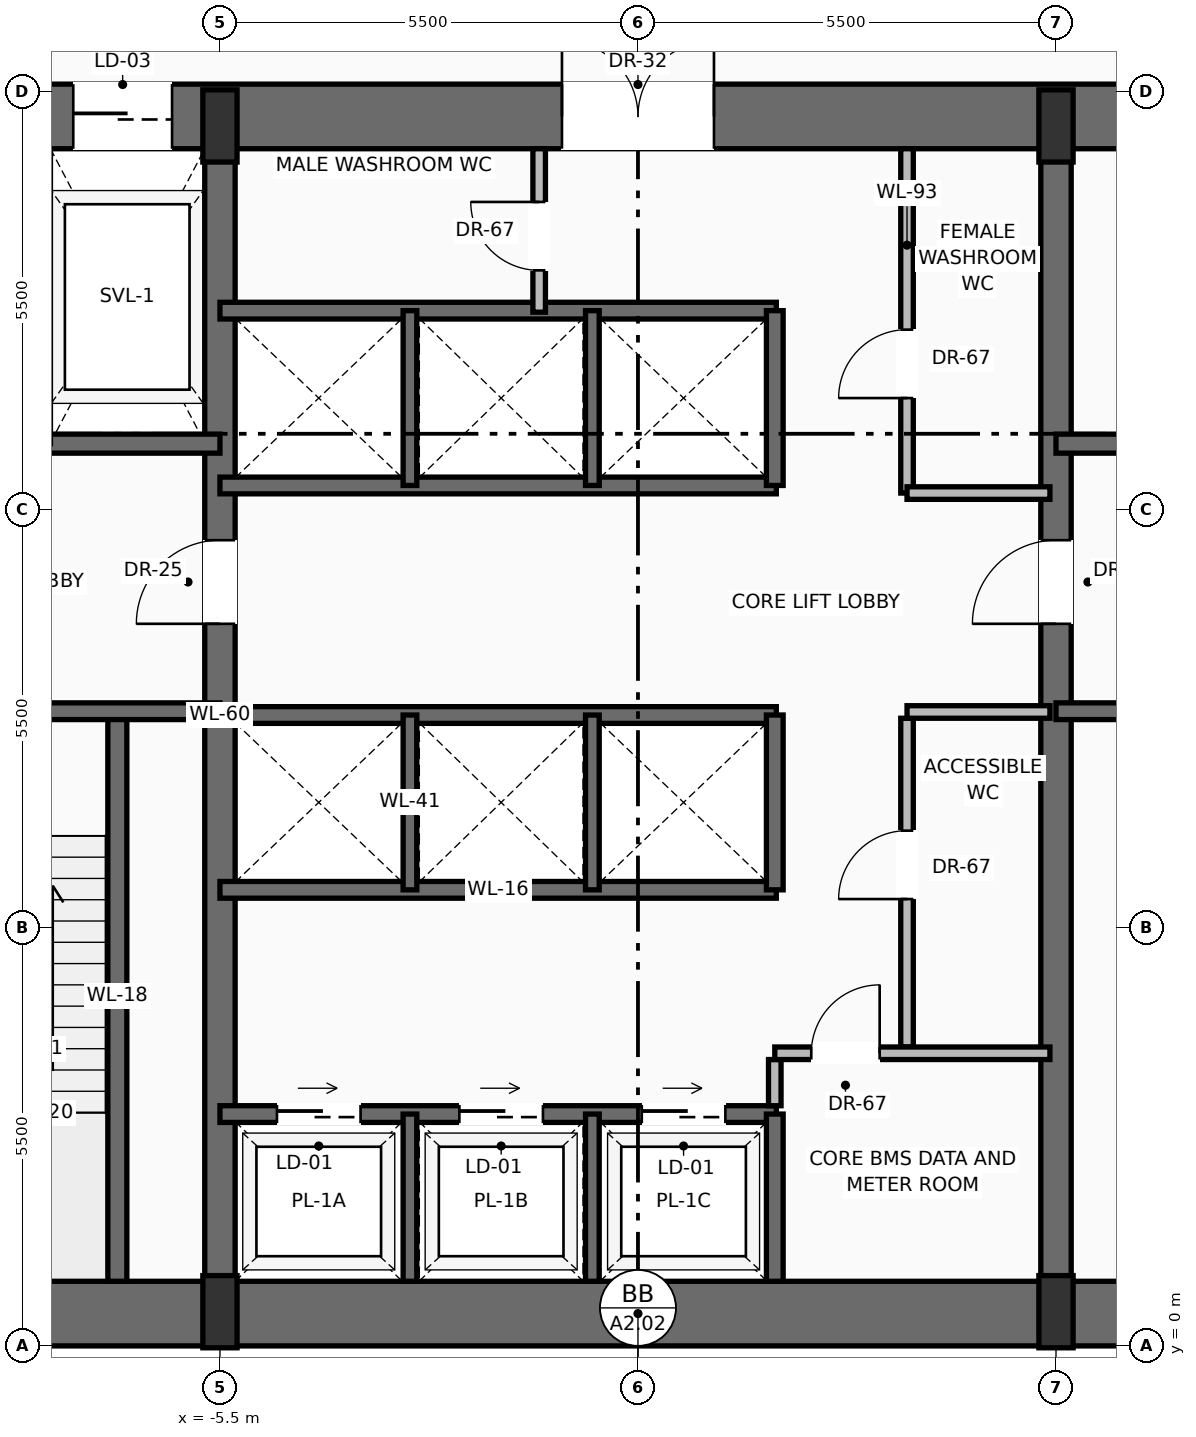
"""IFC4 building model, lengths in metres.
Left out: names, types, materials, properties, quantities, classifications, styles, units other than length and angle.
Written with IfcOpenShell. Run it as: python <this file> out.ifc"""

import sys

from ifc_helpers import new_model, si_unit, direction, frame, frame_2d, origin, origin_2d, place, context, subcontext, project, spatial, rectangle, extrude, source, transform, mapped, element, fill, save


model = new_model("IFC4")
c1 = context("Model", 3, precision=1e-05, world=origin(), true_north=direction((0.0, 1.0)))
c2 = subcontext(c1, "Body", "Model", "MODEL_VIEW")
j1 = project(units=[si_unit("LENGTHUNIT", "METRE"), si_unit("PLANEANGLEUNIT", "RADIAN")], contexts=[c1])
p1 = place(None, origin())
s1 = spatial("IfcSite", under=j1, at=p1, CompositionType="ELEMENT")
p2 = place(p1, origin())
s2 = spatial("IfcBuilding", under=s1, at=p2, CompositionType="ELEMENT")
p3 = place(p2, frame((0.0, 0.0, 71.9)))
s3 = spatial("IfcBuildingStorey", under=s2, at=p3, CompositionType="ELEMENT", Elevation=71.9)
p4 = place(p3, frame((-10.65, 0.425, 0.0), z_axis=(0.0, 0.0, 1.0), x_axis=(1.0, 0.0, 0.0)))
e1 = element("IfcWall", 1, at=p4, inside=s3, PredefinedType="SHEAR", context=c2, shape_type="SweptSolid", body=[
    extrude(rectangle(XDim=21.3, YDim=0.85, at=frame_2d((10.65, 0.0))), origin(), (0.0, 0.0, 1.0), 4.45),
])
p5 = place(p3, frame((-11.0, 16.175, 0.0), z_axis=(0.0, 0.0, 1.0), x_axis=(1.0, 0.0, 0.0)))
e2 = element("IfcWall", 2, at=p5, inside=s3, PredefinedType="SHEAR", context=c2, shape_type="SweptSolid", body=[
    extrude(rectangle(XDim=22.0, YDim=0.85, at=frame_2d((11.0, 0.0))), origin(), (0.0, 0.0, 1.0), 4.45),
])
p6 = place(p5, frame((3.57, 0.0, 0.0)))
e3 = element("IfcOpeningElement", 3, at=p6, cuts=e2, PredefinedType="OPENING", context=c2, shape_type="SweptSolid", body=[
    extrude(rectangle(XDim=1.3, YDim=2.3, at=frame_2d((0.65, 1.15))), frame((0.0, 0.435, 0.0), z_axis=(0.0, -1.0, 0.0), x_axis=(1.0, 0.0, 0.0)), (0.0, 0.0, 1.0), 0.87),
])
p7 = place(p5, frame((10.0, 0.0, 0.0)))
e4 = element("IfcOpeningElement", 4, at=p7, cuts=e2, PredefinedType="OPENING", context=c2, shape_type="SweptSolid", body=[
    extrude(rectangle(XDim=2.0, YDim=2.4, at=frame_2d((1.0, 1.2))), frame((0.0, 0.435, 0.0), z_axis=(0.0, -1.0, 0.0), x_axis=(1.0, 0.0, 0.0)), (0.0, 0.0, 1.0), 0.87),
])
p8 = place(p3, frame((-5.5, 0.425, 0.0), z_axis=(0.0, 0.0, 1.0), x_axis=(0.0, 1.0, 0.0)))
e5 = element("IfcWall", 5, at=p8, inside=s3, PredefinedType="SHEAR", context=c2, shape_type="SweptSolid", body=[
    extrude(rectangle(XDim=15.75, YDim=0.4, at=frame_2d((7.875, 0.0))), origin(), (0.0, 0.0, 1.0), 4.45),
])
p9 = place(p8, frame((9.075, 0.0, 0.0)))
e6 = element("IfcOpeningElement", 6, at=p9, cuts=e5, PredefinedType="OPENING", context=c2, shape_type="SweptSolid", body=[
    extrude(rectangle(XDim=1.1, YDim=2.2, at=frame_2d((0.55, 1.1))), frame((0.0, 0.21, 0.0), z_axis=(0.0, -1.0, 0.0), x_axis=(1.0, 0.0, 0.0)), (0.0, 0.0, 1.0), 0.42),
])
p10 = place(p3, frame((5.5, 0.425, 0.0), z_axis=(0.0, 0.0, 1.0), x_axis=(0.0, 1.0, 0.0)))
e7 = element("IfcWall", 7, at=p10, inside=s3, PredefinedType="SHEAR", context=c2, shape_type="SweptSolid", body=[
    extrude(rectangle(XDim=15.75, YDim=0.4, at=frame_2d((7.875, 0.0))), origin(), (0.0, 0.0, 1.0), 4.45),
])
p11 = place(p10, frame((9.075, 0.0, 0.0)))
e8 = element("IfcOpeningElement", 8, at=p11, cuts=e7, PredefinedType="OPENING", context=c2, shape_type="SweptSolid", body=[
    extrude(rectangle(XDim=1.1, YDim=2.2, at=frame_2d((0.55, 1.1))), frame((0.0, 0.21, 0.0), z_axis=(0.0, -1.0, 0.0), x_axis=(1.0, 0.0, 0.0)), (0.0, 0.0, 1.0), 0.42),
])
m1 = source(origin(), c2, "Body", "SweptSolid", [
    extrude(rectangle(XDim=0.45, YDim=0.95, at=origin_2d()), origin(), (0.0, 0.0, 1.0), 4.7),
])
for number, where, z_axis, x_axis in (
    (9, (-5.5, 0.45, 0.0), (0.0, 0.0, 1.0), (1.0, 0.0, 0.0)),
    (10, (5.5, 0.45, 0.0), (0.0, 0.0, 1.0), (1.0, 0.0, 0.0)),
    (11, (-5.5, 16.05, 0.0), (0.0, 0.0, 1.0), (1.0, 0.0, 0.0)),
    (12, (5.5, 16.05, 0.0), (0.0, 0.0, 1.0), (1.0, 0.0, 0.0)),
):
    element("IfcColumn", number, at=place(p3, frame(where, z_axis=z_axis, x_axis=x_axis)), inside=s3, PredefinedType="PILASTER", context=c2, shape_type="MappedRepresentation", body=[
        mapped(m1, transform((0.0, 0.0, 0.0), scale=1.0)),
    ])
p12 = place(p3, frame((-6.85, 0.85, 0.0), z_axis=(0.0, 0.0, 1.0), x_axis=(0.0, 1.0, 0.0)))
e13 = element("IfcWall", 13, at=p12, inside=s3, PredefinedType="SOLIDWALL", context=c2, shape_type="SweptSolid", body=[
    extrude(rectangle(XDim=7.5, YDim=0.25, at=frame_2d((3.75, 0.0))), origin(), (0.0, 0.0, 1.0), 4.45),
])
p13 = place(p3, frame((-5.5, 8.35, 0.0), z_axis=(0.0, 0.0, 1.0), x_axis=(-1.0, 0.0, 0.0)))
e14 = element("IfcWall", 14, at=p13, inside=s3, PredefinedType="SOLIDWALL", context=c2, shape_type="SweptSolid", body=[
    extrude(rectangle(XDim=4.65, YDim=0.22, at=frame_2d((2.325, 0.0))), origin(), (0.0, 0.0, 1.0), 4.45),
])
p14 = place(p13, frame((2.5, 0.0, 0.0)))
e15 = element("IfcOpeningElement", 15, at=p14, cuts=e14, PredefinedType="OPENING", context=c2, shape_type="SweptSolid", body=[
    extrude(rectangle(XDim=1.15, YDim=2.2, at=frame_2d((0.575, 1.1))), frame((0.0, 0.12, 0.0), z_axis=(0.0, -1.0, 0.0), x_axis=(1.0, 0.0, 0.0)), (0.0, 0.0, 1.0), 0.24),
])
p15 = place(p3, frame((-5.5, 11.87, 0.0), z_axis=(0.0, 0.0, 1.0), x_axis=(-1.0, 0.0, 0.0)))
e16 = element("IfcWall", 16, at=p15, inside=s3, PredefinedType="SOLIDWALL", context=c2, shape_type="SweptSolid", body=[
    extrude(rectangle(XDim=4.65, YDim=0.25, at=frame_2d((2.325, 0.0))), origin(), (0.0, 0.0, 1.0), 4.45),
])
p16 = place(p15, frame((2.95, 0.0, 0.0)))
e17 = element("IfcOpeningElement", 17, at=p16, cuts=e16, PredefinedType="OPENING", context=c2, shape_type="SweptSolid", body=[
    extrude(rectangle(XDim=1.2, YDim=2.25, at=frame_2d((0.6, 1.125))), frame((0.0, 0.135, 0.0), z_axis=(0.0, -1.0, 0.0), x_axis=(1.0, 0.0, 0.0)), (0.0, 0.0, 1.0), 0.27),
])
p17 = place(p3, frame((10.15, 8.35, 0.0), z_axis=(0.0, 0.0, 1.0), x_axis=(-1.0, 0.0, 0.0)))
e18 = element("IfcWall", 18, at=p17, inside=s3, PredefinedType="SOLIDWALL", context=c2, shape_type="SweptSolid", body=[
    extrude(rectangle(XDim=4.65, YDim=0.22, at=frame_2d((2.325, 0.0))), origin(), (0.0, 0.0, 1.0), 4.45),
])
p18 = place(p17, frame((1.0, 0.0, 0.0)))
e19 = element("IfcOpeningElement", 19, at=p18, cuts=e18, PredefinedType="OPENING", context=c2, shape_type="SweptSolid", body=[
    extrude(rectangle(XDim=1.15, YDim=2.2, at=frame_2d((0.575, 1.1))), frame((0.0, 0.12, 0.0), z_axis=(0.0, -1.0, 0.0), x_axis=(1.0, 0.0, 0.0)), (0.0, 0.0, 1.0), 0.24),
])
p19 = place(p3, frame((10.15, 11.87, 0.0), z_axis=(0.0, 0.0, 1.0), x_axis=(-1.0, 0.0, 0.0)))
e20 = element("IfcWall", 20, at=p19, inside=s3, PredefinedType="SOLIDWALL", context=c2, shape_type="SweptSolid", body=[
    extrude(rectangle(XDim=4.65, YDim=0.25, at=frame_2d((2.325, 0.0))), origin(), (0.0, 0.0, 1.0), 4.45),
])
p20 = place(p19, frame((0.5, 0.0, 0.0)))
e21 = element("IfcOpeningElement", 21, at=p20, cuts=e20, PredefinedType="OPENING", context=c2, shape_type="SweptSolid", body=[
    extrude(rectangle(XDim=1.2, YDim=2.25, at=frame_2d((0.6, 1.125))), frame((0.0, 0.135, 0.0), z_axis=(0.0, -1.0, 0.0), x_axis=(1.0, 0.0, 0.0)), (0.0, 0.0, 1.0), 0.27),
])
p21 = place(p3, frame((-5.5, 3.05, 0.0), z_axis=(0.0, 0.0, 1.0), x_axis=(1.0, 0.0, 0.0)))
e22 = element("IfcWall", 22, at=p21, inside=s3, PredefinedType="SOLIDWALL", context=c2, shape_type="SweptSolid", body=[
    extrude(rectangle(XDim=7.32, YDim=0.22, at=frame_2d((3.66, 0.0))), origin(), (0.0, 0.0, 1.0), 4.45),
])
p22 = place(p21, frame((0.75, 0.0, 0.0)))
e23 = element("IfcOpeningElement", 23, at=p22, cuts=e22, PredefinedType="OPENING", context=c2, shape_type="SweptSolid", body=[
    extrude(rectangle(XDim=1.1, YDim=2.2, at=frame_2d((0.55, 1.1))), frame((0.0, 0.12, 0.0), z_axis=(0.0, -1.0, 0.0), x_axis=(1.0, 0.0, 0.0)), (0.0, 0.0, 1.0), 0.24),
])
p23 = place(p21, frame((3.15, 0.0, 0.0)))
e24 = element("IfcOpeningElement", 24, at=p23, cuts=e22, PredefinedType="OPENING", context=c2, shape_type="SweptSolid", body=[
    extrude(rectangle(XDim=1.1, YDim=2.2, at=frame_2d((0.55, 1.1))), frame((0.0, 0.12, 0.0), z_axis=(0.0, -1.0, 0.0), x_axis=(1.0, 0.0, 0.0)), (0.0, 0.0, 1.0), 0.24),
])
p24 = place(p21, frame((5.55, 0.0, 0.0)))
e25 = element("IfcOpeningElement", 25, at=p24, cuts=e22, PredefinedType="OPENING", context=c2, shape_type="SweptSolid", body=[
    extrude(rectangle(XDim=1.1, YDim=2.2, at=frame_2d((0.55, 1.1))), frame((0.0, 0.12, 0.0), z_axis=(0.0, -1.0, 0.0), x_axis=(1.0, 0.0, 0.0)), (0.0, 0.0, 1.0), 0.24),
])
p25 = place(p3, frame((1.8, 0.85, 0.0), z_axis=(0.0, 0.0, 1.0), x_axis=(0.0, 1.0, 0.0)))
e26 = element("IfcWall", 26, at=p25, inside=s3, PredefinedType="SOLIDWALL", context=c2, shape_type="SweptSolid", body=[
    extrude(rectangle(XDim=2.2, YDim=0.22, at=frame_2d((1.1, 0.0))), origin(), (0.0, 0.0, 1.0), 4.45),
])
for number, where, z_axis, x_axis in (
    (27, (-3.0, 0.85, 0.0), (0.0, 0.0, 1.0), (0.0, 1.0, 0.0)),
    (28, (-0.6, 0.85, 0.0), (0.0, 0.0, 1.0), (0.0, 1.0, 0.0)),
):
    element("IfcWall", number, at=place(p3, frame(where, z_axis=z_axis, x_axis=x_axis)), inside=s3, PredefinedType="SOLIDWALL", context=c2, shape_type="SweptSolid", body=[
        extrude(rectangle(XDim=2.2, YDim=0.18, at=frame_2d((1.1, 0.0))), origin(), (0.0, 0.0, 1.0), 4.45),
    ])
p26 = place(p3, frame((1.8, 3.16, 0.0), z_axis=(0.0, 0.0, 1.0), x_axis=(0.0, 1.0, 0.0)))
e29 = element("IfcWall", 29, at=p26, inside=s3, PredefinedType="PARTITIONING", context=c2, shape_type="SweptSolid", body=[
    extrude(rectangle(XDim=0.608, YDim=0.165, at=frame_2d((0.304, 0.0))), origin(), (0.0, 0.0, 1.0), 4.442),
])
p27 = place(p3, frame((3.54, 3.933, 0.0), z_axis=(0.0, 0.0, 1.0), x_axis=(0.0, 1.0, 0.0)))
e30 = element("IfcWall", 30, at=p27, inside=s3, PredefinedType="PARTITIONING", context=c2, shape_type="SweptSolid", body=[
    extrude(rectangle(XDim=4.325, YDim=0.165, at=frame_2d((2.163, 0.0))), origin(), (0.0, 0.0, 1.0), 4.442),
])
p28 = place(p27, frame((1.946, 0.0, 0.0)))
e31 = element("IfcOpeningElement", 31, at=p28, cuts=e30, PredefinedType="OPENING", context=c2, shape_type="SweptSolid", body=[
    extrude(rectangle(XDim=0.9, YDim=2.1, at=frame_2d((0.45, 1.05))), frame((0.0, 0.093, 0.0), z_axis=(0.0, -1.0, 0.0), x_axis=(1.0, 0.0, 0.0)), (0.0, 0.0, 1.0), 0.185),
])
p29 = place(p3, frame((3.54, 8.34, 0.0), z_axis=(0.0, 0.0, 1.0), x_axis=(1.0, 0.0, 0.0)))
e32 = element("IfcWall", 32, at=p29, inside=s3, PredefinedType="PARTITIONING", context=c2, shape_type="SweptSolid", body=[
    extrude(rectangle(XDim=1.88, YDim=0.165, at=frame_2d((0.94, 0.0))), origin(), (0.0, 0.0, 1.0), 4.442),
])
p30 = place(p3, frame((1.8, 3.85, 0.0), z_axis=(0.0, 0.0, 1.0), x_axis=(1.0, 0.0, 0.0)))
e33 = element("IfcWall", 33, at=p30, inside=s3, PredefinedType="PARTITIONING", context=c2, shape_type="SweptSolid", body=[
    extrude(rectangle(XDim=3.62, YDim=0.165, at=frame_2d((1.81, 0.0))), origin(), (0.0, 0.0, 1.0), 4.442),
])
p31 = place(p30, frame((0.48, 0.0, 0.0)))
e34 = element("IfcOpeningElement", 34, at=p31, cuts=e33, PredefinedType="OPENING", context=c2, shape_type="SweptSolid", body=[
    extrude(rectangle(XDim=0.9, YDim=2.1, at=frame_2d((0.45, 1.05))), frame((0.0, 0.093, 0.0), z_axis=(0.0, -1.0, 0.0), x_axis=(1.0, 0.0, 0.0)), (0.0, 0.0, 1.0), 0.185),
])
for number, where, z_axis, x_axis in (
    (35, (-5.5, 6.0, 0.0), (0.0, 0.0, 1.0), (1.0, 0.0, 0.0)),
    (36, (-5.5, 8.3, 0.0), (0.0, 0.0, 1.0), (1.0, 0.0, 0.0)),
):
    element("IfcWall", number, at=place(p3, frame(where, z_axis=z_axis, x_axis=x_axis)), inside=s3, PredefinedType="SOLIDWALL", context=c2, shape_type="SweptSolid", body=[
        extrude(rectangle(XDim=7.32, YDim=0.22, at=frame_2d((3.66, 0.0))), origin(), (0.0, 0.0, 1.0), 4.45),
    ])
p32 = place(p3, frame((1.8, 6.0, 0.0), z_axis=(0.0, 0.0, 1.0), x_axis=(0.0, 1.0, 0.0)))
e37 = element("IfcWall", 37, at=p32, inside=s3, PredefinedType="SOLIDWALL", context=c2, shape_type="SweptSolid", body=[
    extrude(rectangle(XDim=2.3, YDim=0.22, at=frame_2d((1.15, 0.0))), origin(), (0.0, 0.0, 1.0), 4.45),
])
for number, where, z_axis, x_axis in (
    (38, (-3.0, 6.0, 0.0), (0.0, 0.0, 1.0), (0.0, 1.0, 0.0)),
    (39, (-0.6, 6.0, 0.0), (0.0, 0.0, 1.0), (0.0, 1.0, 0.0)),
):
    element("IfcWall", number, at=place(p3, frame(where, z_axis=z_axis, x_axis=x_axis)), inside=s3, PredefinedType="SOLIDWALL", context=c2, shape_type="SweptSolid", body=[
        extrude(rectangle(XDim=2.3, YDim=0.18, at=frame_2d((1.15, 0.0))), origin(), (0.0, 0.0, 1.0), 4.45),
    ])
for number, where, z_axis, x_axis in (
    (40, (-5.5, 11.32, 0.0), (0.0, 0.0, 1.0), (1.0, 0.0, 0.0)),
    (41, (-5.5, 13.62, 0.0), (0.0, 0.0, 1.0), (1.0, 0.0, 0.0)),
):
    element("IfcWall", number, at=place(p3, frame(where, z_axis=z_axis, x_axis=x_axis)), inside=s3, PredefinedType="SOLIDWALL", context=c2, shape_type="SweptSolid", body=[
        extrude(rectangle(XDim=7.32, YDim=0.22, at=frame_2d((3.66, 0.0))), origin(), (0.0, 0.0, 1.0), 4.45),
    ])
p33 = place(p3, frame((1.8, 11.32, 0.0), z_axis=(0.0, 0.0, 1.0), x_axis=(0.0, 1.0, 0.0)))
e42 = element("IfcWall", 42, at=p33, inside=s3, PredefinedType="SOLIDWALL", context=c2, shape_type="SweptSolid", body=[
    extrude(rectangle(XDim=2.3, YDim=0.22, at=frame_2d((1.15, 0.0))), origin(), (0.0, 0.0, 1.0), 4.45),
])
for number, where, z_axis, x_axis in (
    (43, (-3.0, 11.32, 0.0), (0.0, 0.0, 1.0), (0.0, 1.0, 0.0)),
    (44, (-0.6, 11.32, 0.0), (0.0, 0.0, 1.0), (0.0, 1.0, 0.0)),
):
    element("IfcWall", number, at=place(p3, frame(where, z_axis=z_axis, x_axis=x_axis)), inside=s3, PredefinedType="SOLIDWALL", context=c2, shape_type="SweptSolid", body=[
        extrude(rectangle(XDim=2.3, YDim=0.18, at=frame_2d((1.15, 0.0))), origin(), (0.0, 0.0, 1.0), 4.45),
    ])
p34 = place(p3, frame((-1.3, 13.6, 0.0), z_axis=(0.0, 0.0, 1.0), x_axis=(0.0, 1.0, 0.0)))
e45 = element("IfcWall", 45, at=p34, inside=s3, PredefinedType="PARTITIONING", context=c2, shape_type="SweptSolid", body=[
    extrude(rectangle(XDim=2.15, YDim=0.165, at=frame_2d((1.075, 0.0))), origin(), (0.0, 0.0, 1.0), 4.442),
])
p35 = place(p34, frame((0.55, 0.0, 0.0)))
e46 = element("IfcOpeningElement", 46, at=p35, cuts=e45, PredefinedType="OPENING", context=c2, shape_type="SweptSolid", body=[
    extrude(rectangle(XDim=0.9, YDim=2.1, at=frame_2d((0.45, 1.05))), frame((0.0, 0.093, 0.0), z_axis=(0.0, -1.0, 0.0), x_axis=(1.0, 0.0, 0.0)), (0.0, 0.0, 1.0), 0.185),
])
p36 = place(p3, frame((3.54, 11.22, 0.0), z_axis=(0.0, 0.0, 1.0), x_axis=(0.0, 1.0, 0.0)))
e47 = element("IfcWall", 47, at=p36, inside=s3, PredefinedType="PARTITIONING", context=c2, shape_type="SweptSolid", body=[
    extrude(rectangle(XDim=4.53, YDim=0.165, at=frame_2d((2.265, 0.0))), origin(), (0.0, 0.0, 1.0), 4.442),
])
p37 = place(p36, frame((1.25, 0.0, 0.0)))
e48 = element("IfcOpeningElement", 48, at=p37, cuts=e47, PredefinedType="OPENING", context=c2, shape_type="SweptSolid", body=[
    extrude(rectangle(XDim=0.9, YDim=2.1, at=frame_2d((0.45, 1.05))), frame((0.0, 0.093, 0.0), z_axis=(0.0, -1.0, 0.0), x_axis=(1.0, 0.0, 0.0)), (0.0, 0.0, 1.0), 0.185),
])
p38 = place(p3, frame((3.54, 11.22, 0.0), z_axis=(0.0, 0.0, 1.0), x_axis=(1.0, 0.0, 0.0)))
e49 = element("IfcWall", 49, at=p38, inside=s3, PredefinedType="PARTITIONING", context=c2, shape_type="SweptSolid", body=[
    extrude(rectangle(XDim=1.88, YDim=0.165, at=frame_2d((0.94, 0.0))), origin(), (0.0, 0.0, 1.0), 4.442),
])
m2 = source(origin(), c2, "Body", "SweptSolid", [
    extrude(rectangle(XDim=1.1, YDim=2.2, at=frame_2d((0.55, 1.1))), frame((0.0, 0.025, 0.0), z_axis=(0.0, -1.0, 0.0), x_axis=(1.0, 0.0, 0.0)), (0.0, 0.0, 1.0), 0.05),
])
p39 = place(p9, origin())
e50 = element("IfcDoor", 50, at=p39, inside=s3, OperationType="SINGLE_SWING_LEFT", PredefinedType="DOOR", context=c2, shape_type="MappedRepresentation", body=[
    mapped(m2, transform((0.0, 0.0, 0.0), scale=1.0)),
])
fill(e6, e50)
m3 = source(origin(), c2, "Body", "SweptSolid", [
    extrude(rectangle(XDim=1.3, YDim=2.3, at=frame_2d((0.65, 1.15))), frame((0.0, 0.025, 0.0), z_axis=(0.0, -1.0, 0.0), x_axis=(1.0, 0.0, 0.0)), (0.0, 0.0, 1.0), 0.05),
])
p40 = place(p6, origin())
e51 = element("IfcDoor", 51, at=p40, inside=s3, OperationType="SLIDING_TO_RIGHT", PredefinedType="DOOR", context=c2, shape_type="MappedRepresentation", body=[
    mapped(m3, transform((0.0, 0.0, 0.0), scale=1.0)),
])
fill(e3, e51)
p41 = place(p11, origin())
e52 = element("IfcDoor", 52, at=p41, inside=s3, OperationType="SINGLE_SWING_LEFT", PredefinedType="DOOR", context=c2, shape_type="MappedRepresentation", body=[
    mapped(m2, transform((0.0, 0.0, 0.0), scale=1.0)),
])
fill(e8, e52)
m4 = source(origin(), c2, "Body", "SweptSolid", [
    extrude(rectangle(XDim=2.0, YDim=2.4, at=frame_2d((1.0, 1.2))), frame((0.0, 0.025, 0.0), z_axis=(0.0, -1.0, 0.0), x_axis=(1.0, 0.0, 0.0)), (0.0, 0.0, 1.0), 0.05),
])
p42 = place(p7, origin())
e53 = element("IfcDoor", 53, at=p42, inside=s3, OperationType="DOUBLE_DOOR_SINGLE_SWING", PredefinedType="DOOR", context=c2, shape_type="MappedRepresentation", body=[
    mapped(m4, transform((0.0, 0.0, 0.0), scale=1.0)),
])
fill(e4, e53)
m5 = source(origin(), c2, "Body", "SweptSolid", [
    extrude(rectangle(XDim=1.1, YDim=2.2, at=frame_2d((0.55, 1.1))), frame((0.0, 0.025, 0.0), z_axis=(0.0, -1.0, 0.0), x_axis=(1.0, 0.0, 0.0)), (0.0, 0.0, 1.0), 0.05),
])
p43 = place(p22, origin())
e54 = element("IfcDoor", 54, at=p43, inside=s3, OperationType="SLIDING_TO_RIGHT", PredefinedType="DOOR", context=c2, shape_type="MappedRepresentation", body=[
    mapped(m5, transform((0.0, 0.0, 0.0), scale=1.0)),
])
fill(e23, e54)
p44 = place(p23, origin())
e55 = element("IfcDoor", 55, at=p44, inside=s3, OperationType="SLIDING_TO_RIGHT", PredefinedType="DOOR", context=c2, shape_type="MappedRepresentation", body=[
    mapped(m5, transform((0.0, 0.0, 0.0), scale=1.0)),
])
fill(e24, e55)
p45 = place(p24, origin())
e56 = element("IfcDoor", 56, at=p45, inside=s3, OperationType="SLIDING_TO_RIGHT", PredefinedType="DOOR", context=c2, shape_type="MappedRepresentation", body=[
    mapped(m5, transform((0.0, 0.0, 0.0), scale=1.0)),
])
fill(e25, e56)
m6 = source(origin(), c2, "Body", "SweptSolid", [
    extrude(rectangle(XDim=0.9, YDim=2.1, at=frame_2d((0.45, 1.05))), frame((0.0, 0.025, 0.0), z_axis=(0.0, -1.0, 0.0), x_axis=(1.0, 0.0, 0.0)), (0.0, 0.0, 1.0), 0.05),
])
p46 = place(p31, origin())
e57 = element("IfcDoor", 57, at=p46, inside=s3, OperationType="SINGLE_SWING_RIGHT", PredefinedType="DOOR", context=c2, shape_type="MappedRepresentation", body=[
    mapped(m6, transform((0.0, 0.0, 0.0), scale=1.0)),
])
fill(e34, e57)
p47 = place(p28, origin())
e58 = element("IfcDoor", 58, at=p47, inside=s3, OperationType="SINGLE_SWING_LEFT", PredefinedType="DOOR", context=c2, shape_type="MappedRepresentation", body=[
    mapped(m6, transform((0.0, 0.0, 0.0), scale=1.0)),
])
fill(e31, e58)
p48 = place(p35, origin())
e59 = element("IfcDoor", 59, at=p48, inside=s3, OperationType="SINGLE_SWING_RIGHT", PredefinedType="DOOR", context=c2, shape_type="MappedRepresentation", body=[
    mapped(m6, transform((0.0, 0.0, 0.0), scale=1.0)),
])
fill(e46, e59)
p49 = place(p37, origin())
e60 = element("IfcDoor", 60, at=p49, inside=s3, OperationType="SINGLE_SWING_LEFT", PredefinedType="DOOR", context=c2, shape_type="MappedRepresentation", body=[
    mapped(m6, transform((0.0, 0.0, 0.0), scale=1.0)),
])
fill(e48, e60)
save(model, sys.argv[1])
